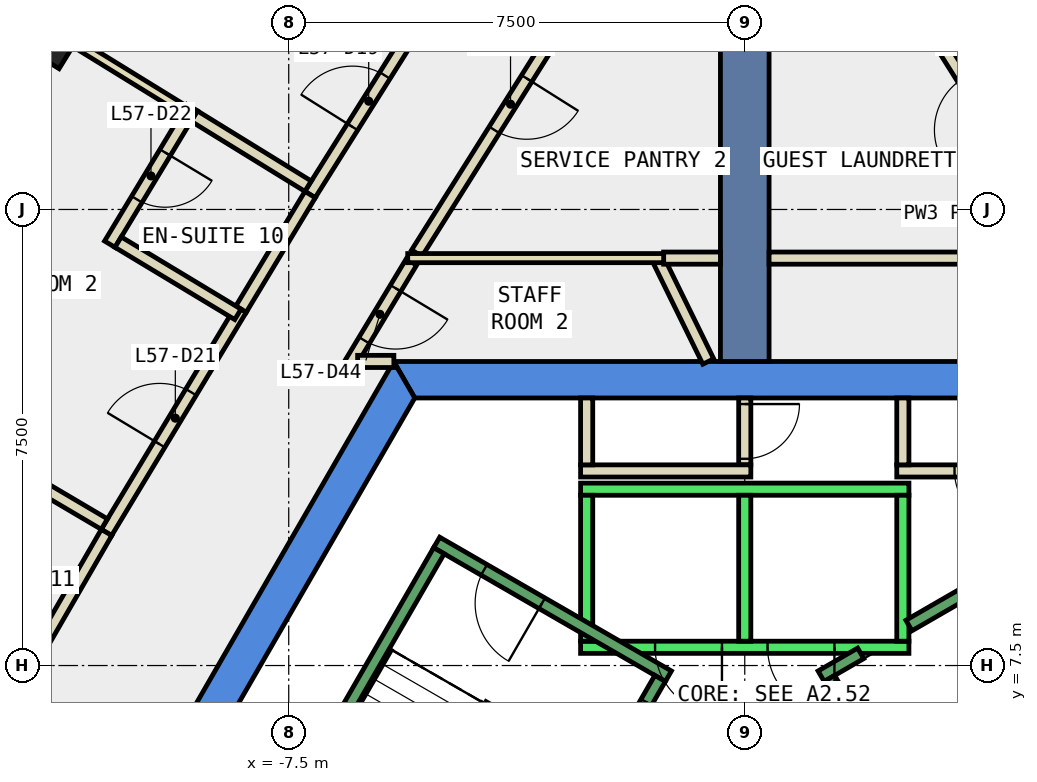
"""IFC4 building model, lengths in metres.
Left out: names, types, materials, properties, quantities, classifications, styles, units other than length and angle.
Written with IfcOpenShell. Run it as: python <this file> out.ifc"""

import sys

from ifc_helpers import new_model, si_unit, direction, frame, frame_2d, origin, origin_2d, place, context, subcontext, project, spatial, polyline, rectangle, outline, extrude, element, fill, save


model = new_model("IFC4")
c1 = context("Model", 3, precision=1e-05, world=origin(), true_north=direction((0.0, 1.0)))
c2 = subcontext(c1, "Body", "Model", "MODEL_VIEW")
j1 = project(units=[si_unit("LENGTHUNIT", "METRE"), si_unit("PLANEANGLEUNIT", "RADIAN")], contexts=[c1])
p1 = place(None, origin())
s1 = spatial("IfcSite", under=j1, at=p1, CompositionType="ELEMENT")
p2 = place(p1, origin())
s2 = spatial("IfcBuilding", under=s1, at=p2, CompositionType="ELEMENT")
p3 = place(p2, frame((0.0, 0.0, 252.2)))
s3 = spatial("IfcBuildingStorey", under=s2, at=p3, CompositionType="ELEMENT", Elevation=252.2)
p4 = place(p3, frame((-11.61, 18.109, -0.34), z_axis=(0.0, 0.0, 1.0), x_axis=(0.525575593337, 0.850746904601, 0.0)))
e1 = element("IfcColumn", 1, at=p4, inside=s3, PredefinedType="COLUMN", context=c2, shape_type="SweptSolid", body=[
    extrude(rectangle(XDim=1.0, YDim=1.4, at=origin_2d()), origin(), (0.0, 0.0, 1.0), 3.6),
])
p5 = place(p3, frame((0.0, 0.0, -0.34)))
e2 = element("IfcWall", 2, at=p5, inside=s3, PredefinedType="SHEAR", context=c2, shape_type="SweptSolid", body=[
    extrude(outline(polyline([(5.774, 12.5), (-5.774, 12.5), (-5.427, 11.9), (5.427, 11.9), (5.774, 12.5)])), origin(), (0.0, 0.0, 1.0), 3.6),
])
p6 = place(p3, frame((0.0, 0.0, -0.34)))
e3 = element("IfcWall", 3, at=p6, inside=s3, PredefinedType="SHEAR", context=c2, shape_type="SweptSolid", body=[
    extrude(outline(polyline([(-10.535, 4.253), (-10.015, 3.953), (-5.427, 11.9), (-5.774, 12.5), (-10.535, 4.253)])), origin(), (0.0, 0.0, 1.0), 3.6),
])
p7 = place(p3, frame((0.0, 12.5, -0.34), z_axis=(0.0, 0.0, 1.0), x_axis=(0.0, 1.0, 0.0)))
e4 = element("IfcWall", 4, at=p7, inside=s3, PredefinedType="SHEAR", context=c2, shape_type="SweptSolid", body=[
    extrude(rectangle(XDim=9.0, YDim=0.8, at=frame_2d((4.5, 0.0))), origin(), (0.0, 0.0, 1.0), 3.6),
])
p8 = place(p3, frame((-0.6, 12.5, 0.0), z_axis=(0.0, 0.0, 1.0), x_axis=(-0.440531456598, 0.897737175206, 0.0)))
e5 = element("IfcWall", 5, at=p8, inside=s3, PredefinedType="PARTITIONING", context=c2, shape_type="SweptSolid", body=[
    extrude(rectangle(XDim=1.918, YDim=0.2, at=frame_2d((0.959, 0.0))), origin(), (0.0, 0.0, 1.0), 3.26),
])
p9 = place(p3, frame((-5.482, 14.136, 0.0), z_axis=(0.0, 0.0, 1.0), x_axis=(-0.516156559549, -0.856494253357, 0.0)))
e6 = element("IfcWall", 6, at=p9, inside=s3, PredefinedType="PARTITIONING", context=c2, shape_type="SweptSolid", body=[
    extrude(rectangle(XDim=2.009, YDim=0.2, at=frame_2d((1.005, 0.0))), origin(), (0.0, 0.0, 1.0), 3.26),
])
p10 = place(p9, frame((0.504, 0.0, 0.0)))
e7 = element("IfcOpeningElement", 7, at=p10, cuts=e6, PredefinedType="OPENING", context=c2, shape_type="SweptSolid", body=[
    extrude(rectangle(XDim=1.0, YDim=2.1, at=frame_2d((0.5, 1.05))), frame((0.0, 0.11, 0.0), z_axis=(0.0, -1.0, 0.0), x_axis=(1.0, 0.0, 0.0)), (0.0, 0.0, 1.0), 0.22),
])
p11 = place(p3, frame((-6.367, 12.501, 0.0), z_axis=(0.0, 0.0, 1.0), x_axis=(1.0, 0.0, 0.0)))
e8 = element("IfcWall", 8, at=p11, inside=s3, PredefinedType="PARTITIONING", context=c2, shape_type="SweptSolid", body=[
    extrude(rectangle(XDim=0.596, YDim=0.2, at=frame_2d((0.298, 0.0))), origin(), (0.0, 0.0, 1.0), 3.26),
])
p12 = place(p3, frame((0.4, 14.2, 0.0), z_axis=(0.0, 0.0, 1.0), x_axis=(1.0, 0.0, 0.0)))
e9 = element("IfcWall", 9, at=p12, inside=s3, PredefinedType="PARTITIONING", context=c2, shape_type="SweptSolid", body=[
    extrude(rectangle(XDim=5.143, YDim=0.2, at=frame_2d((2.572, 0.0))), origin(), (0.0, 0.0, 1.0), 3.26),
])
p13 = place(p3, frame((5.394, 14.281, 0.0), z_axis=(0.0, 0.0, 1.0), x_axis=(-0.532551510955, 0.846397594621, 0.0)))
e10 = element("IfcWall", 10, at=p13, inside=s3, PredefinedType="PARTITIONING", context=c2, shape_type="SweptSolid", body=[
    extrude(rectangle(XDim=5.789, YDim=0.2, at=frame_2d((2.895, 0.0))), origin(), (0.0, 0.0, 1.0), 3.26),
])
p14 = place(p13, frame((2.394, 0.0, 0.0)))
e11 = element("IfcOpeningElement", 11, at=p14, cuts=e10, PredefinedType="OPENING", context=c2, shape_type="SweptSolid", body=[
    extrude(rectangle(XDim=1.0, YDim=2.1, at=frame_2d((0.5, 1.05))), frame((0.0, 0.11, 0.0), z_axis=(0.0, -1.0, 0.0), x_axis=(1.0, 0.0, 0.0)), (0.0, 0.0, 1.0), 0.22),
])
p15 = place(p3, frame((-1.334, 14.2, 0.0), z_axis=(0.0, 0.0, 1.0), x_axis=(1.0, 0.0, 0.0)))
e12 = element("IfcWall", 12, at=p15, inside=s3, PredefinedType="PARTITIONING", context=c2, shape_type="SweptSolid", body=[
    extrude(rectangle(XDim=0.934, YDim=0.2, at=frame_2d((0.467, 0.0))), origin(), (0.0, 0.0, 1.0), 3.26),
])
p16 = place(p3, frame((-2.311, 19.181, 0.0), z_axis=(0.0, 0.0, 1.0), x_axis=(-0.532551510955, -0.846397594621, 0.0)))
e13 = element("IfcWall", 13, at=p16, inside=s3, PredefinedType="PARTITIONING", context=c2, shape_type="SweptSolid", body=[
    extrude(rectangle(XDim=5.789, YDim=0.2, at=frame_2d((2.895, 0.0))), origin(), (0.0, 0.0, 1.0), 3.26),
])
p17 = place(p16, frame((2.394, 0.0, 0.0)))
e14 = element("IfcOpeningElement", 14, at=p17, cuts=e13, PredefinedType="OPENING", context=c2, shape_type="SweptSolid", body=[
    extrude(rectangle(XDim=1.0, YDim=2.1, at=frame_2d((0.5, 1.05))), frame((0.0, 0.11, 0.0), z_axis=(0.0, -1.0, 0.0), x_axis=(1.0, 0.0, 0.0)), (0.0, 0.0, 1.0), 0.22),
])
p18 = place(p3, frame((-7.15, 15.246, 0.0), z_axis=(0.0, 0.0, 1.0), x_axis=(0.532449518014, 0.846461759778, 0.0)))
e15 = element("IfcWall", 15, at=p18, inside=s3, PredefinedType="PARTITIONING", context=c2, shape_type="SweptSolid", body=[
    extrude(rectangle(XDim=3.525, YDim=0.2, at=frame_2d((1.763, 0.0))), origin(), (0.0, 0.0, 1.0), 3.26),
])
p19 = place(p18, frame((1.313, 0.0, 0.0)))
e16 = element("IfcOpeningElement", 16, at=p19, cuts=e15, PredefinedType="OPENING", context=c2, shape_type="SweptSolid", body=[
    extrude(rectangle(XDim=1.0, YDim=2.1, at=frame_2d((0.5, 1.05))), frame((0.0, 0.11, 0.0), z_axis=(0.0, -1.0, 0.0), x_axis=(1.0, 0.0, 0.0)), (0.0, 0.0, 1.0), 0.22),
])
p20 = place(p3, frame((-10.498, 9.689, 0.0), z_axis=(0.0, 0.0, 1.0), x_axis=(0.516353342298, 0.856375633643, 0.0)))
e17 = element("IfcWall", 17, at=p20, inside=s3, PredefinedType="PARTITIONING", context=c2, shape_type="SweptSolid", body=[
    extrude(rectangle(XDim=4.288, YDim=0.2, at=frame_2d((2.144, 0.0))), origin(), (0.0, 0.0, 1.0), 3.26),
])
p21 = place(p20, frame((1.694, 0.0, 0.0)))
e18 = element("IfcOpeningElement", 18, at=p21, cuts=e17, PredefinedType="OPENING", context=c2, shape_type="SweptSolid", body=[
    extrude(rectangle(XDim=1.0, YDim=2.1, at=frame_2d((0.5, 1.05))), frame((0.0, 0.11, 0.0), z_axis=(0.0, -1.0, 0.0), x_axis=(1.0, 0.0, 0.0)), (0.0, 0.0, 1.0), 0.22),
])
p22 = place(p3, frame((-8.284, 13.361, 0.0), z_axis=(0.0, 0.0, 1.0), x_axis=(0.516354965559, 0.856374654893, 0.0)))
e19 = element("IfcWall", 19, at=p22, inside=s3, PredefinedType="PARTITIONING", context=c2, shape_type="SweptSolid", body=[
    extrude(rectangle(XDim=2.2, YDim=0.2, at=frame_2d((1.1, 0.0))), origin(), (0.0, 0.0, 1.0), 3.26),
])
p23 = place(p3, frame((-11.696, 7.61, 0.0), z_axis=(0.0, 0.0, 1.0), x_axis=(0.500089422704, 0.865973769406, 0.0)))
e20 = element("IfcWall", 20, at=p23, inside=s3, PredefinedType="PARTITIONING", context=c2, shape_type="SweptSolid", body=[
    extrude(rectangle(XDim=2.399, YDim=0.2, at=frame_2d((1.2, 0.0))), origin(), (0.0, 0.0, 1.0), 3.26),
])
p24 = place(p3, frame((5.3, 10.7, 0.0), z_axis=(0.0, 0.0, 1.0), x_axis=(-1.0, 0.0, 0.0)))
e21 = element("IfcWall", 21, at=p24, inside=s3, PredefinedType="PARTITIONING", context=c2, shape_type="SweptSolid", body=[
    extrude(rectangle(XDim=2.8, YDim=0.2, at=frame_2d((1.4, 0.0))), origin(), (0.0, 0.0, 1.0), 3.26),
])
p25 = place(p24, frame((0.95, 0.0, 0.0)))
e22 = element("IfcOpeningElement", 22, at=p25, cuts=e21, PredefinedType="OPENING", context=c2, shape_type="SweptSolid", body=[
    extrude(rectangle(XDim=0.9, YDim=2.1, at=frame_2d((0.45, 1.05))), frame((0.0, 0.11, 0.0), z_axis=(0.0, -1.0, 0.0), x_axis=(1.0, 0.0, 0.0)), (0.0, 0.0, 1.0), 0.22),
])
p26 = place(p3, frame((2.6, 10.8, 0.0), z_axis=(0.0, 0.0, 1.0), x_axis=(0.0, 1.0, 0.0)))
e23 = element("IfcWall", 23, at=p26, inside=s3, PredefinedType="PARTITIONING", context=c2, shape_type="SweptSolid", body=[
    extrude(rectangle(XDim=1.1, YDim=0.2, at=frame_2d((0.55, 0.0))), origin(), (0.0, 0.0, 1.0), 3.26),
])
p27 = place(p3, frame((0.0, 11.9, 0.0), z_axis=(0.0, 0.0, 1.0), x_axis=(0.0, -1.0, 0.0)))
e24 = element("IfcWall", 24, at=p27, inside=s3, PredefinedType="PARTITIONING", context=c2, shape_type="SweptSolid", body=[
    extrude(rectangle(XDim=1.1, YDim=0.2, at=frame_2d((0.55, 0.0))), origin(), (0.0, 0.0, 1.0), 3.26),
])
p28 = place(p27, frame((0.1, 0.0, 0.0)))
e25 = element("IfcOpeningElement", 25, at=p28, cuts=e24, PredefinedType="OPENING", context=c2, shape_type="SweptSolid", body=[
    extrude(rectangle(XDim=0.9, YDim=2.1, at=frame_2d((0.45, 1.05))), frame((0.0, 0.11, 0.0), z_axis=(0.0, -1.0, 0.0), x_axis=(1.0, 0.0, 0.0)), (0.0, 0.0, 1.0), 0.22),
])
p29 = place(p3, frame((0.1, 10.7, 0.0), z_axis=(0.0, 0.0, 1.0), x_axis=(-1.0, 0.0, 0.0)))
e26 = element("IfcWall", 26, at=p29, inside=s3, PredefinedType="PARTITIONING", context=c2, shape_type="SweptSolid", body=[
    extrude(rectangle(XDim=2.8, YDim=0.2, at=frame_2d((1.4, 0.0))), origin(), (0.0, 0.0, 1.0), 3.26),
])
p30 = place(p3, frame((-2.6, 10.8, 0.0), z_axis=(0.0, 0.0, 1.0), x_axis=(0.0, 1.0, 0.0)))
e27 = element("IfcWall", 27, at=p30, inside=s3, PredefinedType="PARTITIONING", context=c2, shape_type="SweptSolid", body=[
    extrude(rectangle(XDim=1.1, YDim=0.2, at=frame_2d((0.55, 0.0))), origin(), (0.0, 0.0, 1.0), 3.26),
])
p31 = place(p3, frame((-1.334, 14.2, 0.0), z_axis=(0.0, 0.0, 1.0), x_axis=(-1.0, 0.0, 0.0)))
e28 = element("IfcWall", 28, at=p31, inside=s3, PredefinedType="PARTITIONING", context=c2, shape_type="SweptSolid", body=[
    extrude(rectangle(XDim=4.209, YDim=0.15, at=frame_2d((2.104, 0.0))), origin(), (0.0, 0.0, 1.0), 3.26),
])
p32 = place(p3, frame((-9.225, 16.641, 0.0), z_axis=(0.0, 0.0, 1.0), x_axis=(-0.85144868382, 0.524437926566, 0.0)))
e29 = element("IfcWall", 29, at=p32, inside=s3, PredefinedType="PARTITIONING", context=c2, shape_type="SweptSolid", body=[
    extrude(rectangle(XDim=2.08, YDim=0.15, at=frame_2d((1.04, 0.0))), origin(), (0.0, 0.0, 1.0), 3.26),
])
p33 = place(p3, frame((-7.182, 15.383, 0.0), z_axis=(0.0, 0.0, 1.0), x_axis=(-0.851498142432, 0.524357619792, 0.0)))
e30 = element("IfcWall", 30, at=p33, inside=s3, PredefinedType="PARTITIONING", context=c2, shape_type="SweptSolid", body=[
    extrude(rectangle(XDim=2.198, YDim=0.2, at=frame_2d((1.099, 0.0))), origin(), (0.0, 0.0, 1.0), 3.26),
])
p34 = place(p3, frame((-9.088, 16.674, 0.0), z_axis=(0.0, 0.0, 1.0), x_axis=(-0.516780274192, -0.856118069081, 0.0)))
e31 = element("IfcWall", 31, at=p34, inside=s3, PredefinedType="PARTITIONING", context=c2, shape_type="SweptSolid", body=[
    extrude(rectangle(XDim=2.623, YDim=0.2, at=frame_2d((1.311, 0.0))), origin(), (0.0, 0.0, 1.0), 3.26),
])
p35 = place(p34, frame((0.861, 0.0, 0.0)))
e32 = element("IfcOpeningElement", 32, at=p35, cuts=e31, PredefinedType="OPENING", context=c2, shape_type="SweptSolid", body=[
    extrude(rectangle(XDim=0.9, YDim=2.1, at=frame_2d((0.45, 1.05))), frame((0.0, 0.11, 0.0), z_axis=(0.0, -1.0, 0.0), x_axis=(1.0, 0.0, 0.0)), (0.0, 0.0, 1.0), 0.22),
])
p36 = place(p3, frame((-10.306, 14.463, 0.0), z_axis=(0.0, 0.0, 1.0), x_axis=(0.856338986581, -0.51641411683, 0.0)))
e33 = element("IfcWall", 33, at=p36, inside=s3, PredefinedType="PARTITIONING", context=c2, shape_type="SweptSolid", body=[
    extrude(rectangle(XDim=2.301, YDim=0.2, at=frame_2d((1.15, 0.0))), origin(), (0.0, 0.0, 1.0), 3.26),
])
p37 = place(p3, frame((-10.532, 9.826, 0.0), z_axis=(0.0, 0.0, 1.0), x_axis=(-0.861311086958, 0.508077958077, 0.0)))
e34 = element("IfcWall", 34, at=p37, inside=s3, PredefinedType="PARTITIONING", context=c2, shape_type="SweptSolid", body=[
    extrude(rectangle(XDim=2.299, YDim=0.2, at=frame_2d((1.149, 0.0))), origin(), (0.0, 0.0, 1.0), 3.26),
])
p38 = place(p3, frame((2.7, 7.8, 0.0), z_axis=(0.0, 0.0, 1.0), x_axis=(-1.0, 0.0, 0.0)))
e35 = element("IfcWall", 35, at=p38, inside=s3, PredefinedType="STANDARD", context=c2, shape_type="SweptSolid", body=[
    extrude(rectangle(XDim=5.4, YDim=0.2, at=frame_2d((2.7, 0.0))), origin(), (0.0, 0.0, 1.0), 3.26),
])
p39 = place(p38, frame((1.225, 0.0, 0.0)))
e36 = element("IfcOpeningElement", 36, at=p39, cuts=e35, PredefinedType="OPENING", context=c2, shape_type="SweptSolid", body=[
    extrude(rectangle(XDim=1.1, YDim=2.1, at=frame_2d((0.55, 1.05))), frame((0.0, 0.11, 0.0), z_axis=(0.0, -1.0, 0.0), x_axis=(1.0, 0.0, 0.0)), (0.0, 0.0, 1.0), 0.22),
])
p40 = place(p38, frame((3.075, 0.0, 0.0)))
e37 = element("IfcOpeningElement", 37, at=p40, cuts=e35, PredefinedType="OPENING", context=c2, shape_type="SweptSolid", body=[
    extrude(rectangle(XDim=1.1, YDim=2.1, at=frame_2d((0.55, 1.05))), frame((0.0, 0.11, 0.0), z_axis=(0.0, -1.0, 0.0), x_axis=(1.0, 0.0, 0.0)), (0.0, 0.0, 1.0), 0.22),
])
p41 = place(p3, frame((2.7, 10.4, 0.0), z_axis=(0.0, 0.0, 1.0), x_axis=(-1.0, 0.0, 0.0)))
e38 = element("IfcWall", 38, at=p41, inside=s3, PredefinedType="STANDARD", context=c2, shape_type="SweptSolid", body=[
    extrude(rectangle(XDim=5.4, YDim=0.2, at=frame_2d((2.7, 0.0))), origin(), (0.0, 0.0, 1.0), 3.26),
])
for number, where, z_axis, x_axis in (
    (39, (2.6, 7.9, 0.0), (0.0, 0.0, 1.0), (0.0, 1.0, 0.0)),
    (40, (0.0, 7.9, 0.0), (0.0, 0.0, 1.0), (0.0, 1.0, 0.0)),
    (41, (-2.6, 7.9, 0.0), (0.0, 0.0, 1.0), (0.0, 1.0, 0.0)),
):
    element("IfcWall", number, at=place(p3, frame(where, z_axis=z_axis, x_axis=x_axis)), inside=s3, PredefinedType="STANDARD", context=c2, shape_type="SweptSolid", body=[
        extrude(rectangle(XDim=2.4, YDim=0.2, at=frame_2d((1.2, 0.0))), origin(), (0.0, 0.0, 1.0), 3.26),
    ])
p42 = place(p3, frame((2.7, 8.158, 0.0), z_axis=(0.0, 0.0, 1.0), x_axis=(0.86611865017, 0.499838457731, 0.0)))
e42 = element("IfcWall", 42, at=p42, inside=s3, PredefinedType="STANDARD", context=c2, shape_type="SweptSolid", body=[
    extrude(rectangle(XDim=2.733, YDim=0.2, at=frame_2d((1.366, 0.0))), origin(), (0.0, 0.0, 1.0), 3.26),
])
p43 = place(p3, frame((1.256, 7.324, 0.0), z_axis=(0.0, 0.0, 1.0), x_axis=(0.865915093549, 0.500191014278, 0.0)))
e43 = element("IfcWall", 43, at=p43, inside=s3, PredefinedType="STANDARD", context=c2, shape_type="SweptSolid", body=[
    extrude(rectangle(XDim=0.752, YDim=0.2, at=frame_2d((0.376, 0.0))), origin(), (0.0, 0.0, 1.0), 3.26),
])
p44 = place(p3, frame((4.843, 1.312, 0.0), z_axis=(0.0, 0.0, 1.0), x_axis=(-0.499963383562, 0.866046543262, 0.0)))
e44 = element("IfcWall", 44, at=p44, inside=s3, PredefinedType="STANDARD", context=c2, shape_type="SweptSolid", body=[
    extrude(rectangle(XDim=6.9, YDim=0.2, at=frame_2d((3.45, 0.0))), origin(), (0.0, 0.0, 1.0), 3.26),
])
p45 = place(p44, frame((0.45, 0.0, 0.0)))
e45 = element("IfcOpeningElement", 45, at=p45, cuts=e44, PredefinedType="OPENING", context=c2, shape_type="SweptSolid", body=[
    extrude(rectangle(XDim=1.1, YDim=2.2, at=frame_2d((0.55, 1.1))), frame((0.0, 0.11, 0.0), z_axis=(0.0, -1.0, 0.0), x_axis=(1.0, 0.0, 0.0)), (0.0, 0.0, 1.0), 0.22),
])
p46 = place(p3, frame((-1.256, 7.324, 0.0), z_axis=(0.0, 0.0, 1.0), x_axis=(-0.866046073146, 0.499964197906, 0.0)))
e46 = element("IfcWall", 46, at=p46, inside=s3, PredefinedType="STANDARD", context=c2, shape_type="SweptSolid", body=[
    extrude(rectangle(XDim=4.4, YDim=0.2, at=frame_2d((2.2, 0.0))), origin(), (0.0, 0.0, 1.0), 3.26),
])
p47 = place(p46, frame((2.4, 0.0, 0.0)))
e47 = element("IfcOpeningElement", 47, at=p47, cuts=e46, PredefinedType="OPENING", context=c2, shape_type="SweptSolid", body=[
    extrude(rectangle(XDim=1.1, YDim=2.2, at=frame_2d((0.55, 1.1))), frame((0.0, 0.11, 0.0), z_axis=(0.0, -1.0, 0.0), x_axis=(1.0, 0.0, 0.0)), (0.0, 0.0, 1.0), 0.22),
])
p48 = place(p3, frame((-1.393, 7.288, 0.0), z_axis=(0.0, 0.0, 1.0), x_axis=(-0.499963383562, -0.866046543262, 0.0)))
e48 = element("IfcWall", 48, at=p48, inside=s3, PredefinedType="STANDARD", context=c2, shape_type="SweptSolid", body=[
    extrude(rectangle(XDim=6.9, YDim=0.2, at=frame_2d((3.45, 0.0))), origin(), (0.0, 0.0, 1.0), 3.26),
])
p49 = place(p48, frame((0.45, 0.0, 0.0)))
e49 = element("IfcOpeningElement", 49, at=p49, cuts=e48, PredefinedType="OPENING", context=c2, shape_type="SweptSolid", body=[
    extrude(rectangle(XDim=1.1, YDim=2.2, at=frame_2d((0.55, 1.1))), frame((0.0, 0.11, 0.0), z_axis=(0.0, -1.0, 0.0), x_axis=(1.0, 0.0, 0.0)), (0.0, 0.0, 1.0), 0.22),
])
p50 = place(p3, frame((-5.03, 9.388, 0.0), z_axis=(0.0, 0.0, 1.0), x_axis=(-0.499978703459, -0.866037698999, 0.0)))
e50 = element("IfcWall", 50, at=p50, inside=s3, PredefinedType="STANDARD", context=c2, shape_type="SweptSolid", body=[
    extrude(rectangle(XDim=6.9, YDim=0.2, at=frame_2d((3.45, 0.0))), origin(), (0.0, 0.0, 1.0), 3.26),
])
p51 = place(p19, origin())
e51 = element("IfcDoor", 51, at=p51, inside=s3, OperationType="SINGLE_SWING_RIGHT", PredefinedType="DOOR", context=c2, shape_type="SweptSolid", body=[
    extrude(rectangle(XDim=1.0, YDim=2.1, at=frame_2d((0.5, 1.05))), frame((0.0, 0.025, 0.0), z_axis=(0.0, -1.0, 0.0), x_axis=(1.0, 0.0, 0.0)), (0.0, 0.0, 1.0), 0.05),
])
fill(e16, e51)
p52 = place(p21, origin())
e52 = element("IfcDoor", 52, at=p52, inside=s3, OperationType="SINGLE_SWING_RIGHT", PredefinedType="DOOR", context=c2, shape_type="SweptSolid", body=[
    extrude(rectangle(XDim=1.0, YDim=2.1, at=frame_2d((0.5, 1.05))), frame((0.0, 0.025, 0.0), z_axis=(0.0, -1.0, 0.0), x_axis=(1.0, 0.0, 0.0)), (0.0, 0.0, 1.0), 0.05),
])
fill(e18, e52)
p53 = place(p35, origin())
e53 = element("IfcDoor", 53, at=p53, inside=s3, OperationType="SINGLE_SWING_LEFT", PredefinedType="DOOR", context=c2, shape_type="SweptSolid", body=[
    extrude(rectangle(XDim=0.9, YDim=2.1, at=frame_2d((0.45, 1.05))), frame((0.0, 0.025, 0.0), z_axis=(0.0, -1.0, 0.0), x_axis=(1.0, 0.0, 0.0)), (0.0, 0.0, 1.0), 0.05),
])
fill(e32, e53)
p54 = place(p17, origin())
e54 = element("IfcDoor", 54, at=p54, inside=s3, OperationType="SINGLE_SWING_LEFT", PredefinedType="DOOR", context=c2, shape_type="SweptSolid", body=[
    extrude(rectangle(XDim=1.0, YDim=2.1, at=frame_2d((0.5, 1.05))), frame((0.0, 0.025, 0.0), z_axis=(0.0, -1.0, 0.0), x_axis=(1.0, 0.0, 0.0)), (0.0, 0.0, 1.0), 0.05),
])
fill(e14, e54)
p55 = place(p10, origin())
e55 = element("IfcDoor", 55, at=p55, inside=s3, OperationType="SINGLE_SWING_LEFT", PredefinedType="DOOR", context=c2, shape_type="SweptSolid", body=[
    extrude(rectangle(XDim=1.0, YDim=2.1, at=frame_2d((0.5, 1.05))), frame((0.0, 0.025, 0.0), z_axis=(0.0, -1.0, 0.0), x_axis=(1.0, 0.0, 0.0)), (0.0, 0.0, 1.0), 0.05),
])
fill(e7, e55)
p56 = place(p25, origin())
e56 = element("IfcDoor", 56, at=p56, inside=s3, OperationType="SINGLE_SWING_RIGHT", PredefinedType="DOOR", context=c2, shape_type="SweptSolid", body=[
    extrude(rectangle(XDim=0.9, YDim=2.1, at=frame_2d((0.45, 1.05))), frame((0.0, 0.025, 0.0), z_axis=(0.0, -1.0, 0.0), x_axis=(1.0, 0.0, 0.0)), (0.0, 0.0, 1.0), 0.05),
])
fill(e22, e56)
p57 = place(p28, origin())
e57 = element("IfcDoor", 57, at=p57, inside=s3, OperationType="SINGLE_SWING_LEFT", PredefinedType="DOOR", context=c2, shape_type="SweptSolid", body=[
    extrude(rectangle(XDim=0.9, YDim=2.1, at=frame_2d((0.45, 1.05))), frame((0.0, 0.025, 0.0), z_axis=(0.0, -1.0, 0.0), x_axis=(1.0, 0.0, 0.0)), (0.0, 0.0, 1.0), 0.05),
])
fill(e25, e57)
p58 = place(p39, origin())
e58 = element("IfcDoor", 58, at=p58, inside=s3, OperationType="SLIDING_TO_LEFT", PredefinedType="DOOR", context=c2, shape_type="SweptSolid", body=[
    extrude(rectangle(XDim=1.1, YDim=2.1, at=frame_2d((0.55, 1.05))), frame((0.0, 0.025, 0.0), z_axis=(0.0, -1.0, 0.0), x_axis=(1.0, 0.0, 0.0)), (0.0, 0.0, 1.0), 0.05),
])
fill(e36, e58)
p59 = place(p40, origin())
e59 = element("IfcDoor", 59, at=p59, inside=s3, OperationType="SLIDING_TO_LEFT", PredefinedType="DOOR", context=c2, shape_type="SweptSolid", body=[
    extrude(rectangle(XDim=1.1, YDim=2.1, at=frame_2d((0.55, 1.05))), frame((0.0, 0.025, 0.0), z_axis=(0.0, -1.0, 0.0), x_axis=(1.0, 0.0, 0.0)), (0.0, 0.0, 1.0), 0.05),
])
fill(e37, e59)
p60 = place(p49, origin())
e60 = element("IfcDoor", 60, at=p60, inside=s3, OperationType="SINGLE_SWING_LEFT", PredefinedType="DOOR", context=c2, shape_type="SweptSolid", body=[
    extrude(rectangle(XDim=1.1, YDim=2.2, at=frame_2d((0.55, 1.1))), frame((0.0, 0.025, 0.0), z_axis=(0.0, -1.0, 0.0), x_axis=(1.0, 0.0, 0.0)), (0.0, 0.0, 1.0), 0.05),
])
fill(e49, e60)
p61 = place(p47, origin())
e61 = element("IfcDoor", 61, at=p61, inside=s3, OperationType="SINGLE_SWING_LEFT", PredefinedType="DOOR", context=c2, shape_type="SweptSolid", body=[
    extrude(rectangle(XDim=1.1, YDim=2.2, at=frame_2d((0.55, 1.1))), frame((0.0, 0.025, 0.0), z_axis=(0.0, -1.0, 0.0), x_axis=(1.0, 0.0, 0.0)), (0.0, 0.0, 1.0), 0.05),
])
fill(e47, e61)
save(model, sys.argv[1])
